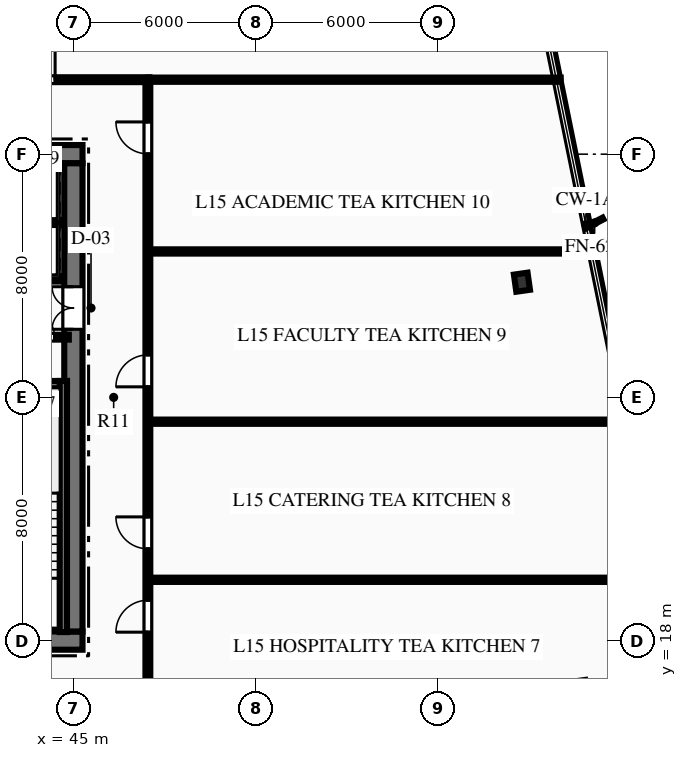
"""IFC4 building model, lengths in metres.
Left out: names, types, materials, properties, quantities, classifications, styles, units other than length and angle.
Written with IfcOpenShell. Run it as: python <this file> out.ifc"""

import sys

from ifc_helpers import new_model, si_unit, direction, frame, frame_2d, origin, origin_2d, place, context, subcontext, project, spatial, rectangle, i_section, extrude, element, fill, save


model = new_model("IFC4")
c1 = context("Model", 3, precision=1e-05, world=origin(), true_north=direction((0.0, 1.0)))
c2 = subcontext(c1, "Body", "Model", "MODEL_VIEW")
j1 = project(units=[si_unit("LENGTHUNIT", "METRE"), si_unit("PLANEANGLEUNIT", "RADIAN")], contexts=[c1])
p1 = place(None, origin())
s1 = spatial("IfcSite", under=j1, at=p1, CompositionType="ELEMENT")
p2 = place(p1, origin())
s2 = spatial("IfcBuilding", under=s1, at=p2, CompositionType="ELEMENT")
p3 = place(p2, frame((0.0, 0.0, 66.45)))
s3 = spatial("IfcBuildingStorey", under=s2, at=p3, CompositionType="ELEMENT", Elevation=66.45)
p4 = place(p3, frame((26.7, 18.0, 0.0), z_axis=(0.0, 0.0, 1.0), x_axis=(1.0, 0.0, 0.0)))
e1 = element("IfcWall", 1, at=p4, inside=s3, PredefinedType="SHEAR", context=c2, shape_type="SweptSolid", body=[
    extrude(rectangle(XDim=18.6, YDim=0.6, at=frame_2d((9.3, 0.0))), origin(), (0.0, 0.0, 1.0), 3.75),
])
p5 = place(p4, frame((7.4, 0.0, 0.0)))
e2 = element("IfcOpeningElement", 2, at=p5, cuts=e1, PredefinedType="OPENING", context=c2, shape_type="SweptSolid", body=[
    extrude(rectangle(XDim=1.1, YDim=2.15, at=frame_2d((0.55, 1.075))), frame((0.0, 0.31, 0.0), z_axis=(0.0, -1.0, 0.0), x_axis=(1.0, 0.0, 0.0)), (0.0, 0.0, 1.0), 0.62),
])
p6 = place(p4, frame((10.1, 0.0, 0.0)))
e3 = element("IfcOpeningElement", 3, at=p6, cuts=e1, PredefinedType="OPENING", context=c2, shape_type="SweptSolid", body=[
    extrude(rectangle(XDim=1.1, YDim=2.15, at=frame_2d((0.55, 1.075))), frame((0.0, 0.31, 0.0), z_axis=(0.0, -1.0, 0.0), x_axis=(1.0, 0.0, 0.0)), (0.0, 0.0, 1.0), 0.62),
])
p7 = place(p3, frame((26.7, 34.0, 0.0), z_axis=(0.0, 0.0, 1.0), x_axis=(1.0, 0.0, 0.0)))
e4 = element("IfcWall", 4, at=p7, inside=s3, PredefinedType="SHEAR", context=c2, shape_type="SweptSolid", body=[
    extrude(rectangle(XDim=18.6, YDim=0.6, at=frame_2d((9.3, 0.0))), origin(), (0.0, 0.0, 1.0), 3.75),
])
p8 = place(p7, frame((1.265, 0.0, 0.0)))
e5 = element("IfcOpeningElement", 5, at=p8, cuts=e4, PredefinedType="OPENING", context=c2, shape_type="SweptSolid", body=[
    extrude(rectangle(XDim=1.1, YDim=2.15, at=frame_2d((0.55, 1.075))), frame((0.0, 0.31, 0.0), z_axis=(0.0, -1.0, 0.0), x_axis=(1.0, 0.0, 0.0)), (0.0, 0.0, 1.0), 0.62),
])
p9 = place(p7, frame((3.515, 0.0, 0.0)))
e6 = element("IfcOpeningElement", 6, at=p9, cuts=e4, PredefinedType="OPENING", context=c2, shape_type="SweptSolid", body=[
    extrude(rectangle(XDim=1.1, YDim=2.15, at=frame_2d((0.55, 1.075))), frame((0.0, 0.31, 0.0), z_axis=(0.0, -1.0, 0.0), x_axis=(1.0, 0.0, 0.0)), (0.0, 0.0, 1.0), 0.62),
])
p10 = place(p7, frame((13.985, 0.0, 0.0)))
e7 = element("IfcOpeningElement", 7, at=p10, cuts=e4, PredefinedType="OPENING", context=c2, shape_type="SweptSolid", body=[
    extrude(rectangle(XDim=1.1, YDim=2.15, at=frame_2d((0.55, 1.075))), frame((0.0, 0.31, 0.0), z_axis=(0.0, -1.0, 0.0), x_axis=(1.0, 0.0, 0.0)), (0.0, 0.0, 1.0), 0.62),
])
p11 = place(p7, frame((16.235, 0.0, 0.0)))
e8 = element("IfcOpeningElement", 8, at=p11, cuts=e4, PredefinedType="OPENING", context=c2, shape_type="SweptSolid", body=[
    extrude(rectangle(XDim=1.1, YDim=2.15, at=frame_2d((0.55, 1.075))), frame((0.0, 0.31, 0.0), z_axis=(0.0, -1.0, 0.0), x_axis=(1.0, 0.0, 0.0)), (0.0, 0.0, 1.0), 0.62),
])
p12 = place(p3, frame((45.0, 18.3, 0.0), z_axis=(0.0, 0.0, 1.0), x_axis=(0.0, 1.0, 0.0)))
e9 = element("IfcWall", 9, at=p12, inside=s3, PredefinedType="SHEAR", context=c2, shape_type="SweptSolid", body=[
    extrude(rectangle(XDim=15.4, YDim=0.6, at=frame_2d((7.7, 0.0))), origin(), (0.0, 0.0, 1.0), 3.75),
])
p13 = place(p12, frame((9.94, 0.0, 0.0)))
e10 = element("IfcOpeningElement", 10, at=p13, cuts=e9, PredefinedType="OPENING", context=c2, shape_type="SweptSolid", body=[
    extrude(rectangle(XDim=1.4, YDim=2.2, at=frame_2d((0.7, 1.1))), frame((0.0, 0.31, 0.0), z_axis=(0.0, -1.0, 0.0), x_axis=(1.0, 0.0, 0.0)), (0.0, 0.0, 1.0), 0.62),
])
p14 = place(p3, frame((40.81, 26.42, 0.0), z_axis=(0.0, 0.0, 1.0), x_axis=(1.0, 0.0, 0.0)))
e11 = element("IfcWall", 11, at=p14, inside=s3, PredefinedType="SHEAR", context=c2, shape_type="SweptSolid", body=[
    extrude(rectangle(XDim=3.98, YDim=0.24, at=frame_2d((1.99, 0.0))), origin(), (0.0, 0.0, 1.0), 3.75),
])
p15 = place(p3, frame((44.67, 18.28, 0.0), z_axis=(0.0, 0.0, 1.0), x_axis=(0.0, 1.0, 0.0)))
e12 = element("IfcWall", 12, at=p15, inside=s3, PredefinedType="SHEAR", context=c2, shape_type="SweptSolid", body=[
    extrude(rectangle(XDim=8.26, YDim=0.24, at=frame_2d((4.13, 0.0))), origin(), (0.0, 0.0, 1.0), 3.75),
])
p16 = place(p3, frame((59.753, 29.789, 0.0), z_axis=(0.0, 0.0, 1.0), x_axis=(0.990146240249, 0.140037219771, 0.0)))
e13 = element("IfcColumn", 13, at=p16, inside=s3, PredefinedType="COLUMN", context=c2, shape_type="SweptSolid", body=[
    extrude(i_section(OverallWidth=0.454, OverallDepth=0.569, WebThickness=0.078, FlangeThickness=0.125, at=origin_2d()), origin(), (0.0, 0.0, 1.0), 3.75),
])
p17 = place(p3, frame((40.8, 27.98, 0.0), z_axis=(0.0, 0.0, 1.0), x_axis=(1.0, 0.0, 0.0)))
e14 = element("IfcWall", 14, at=p17, inside=s3, PredefinedType="PARTITIONING", context=c2, shape_type="SweptSolid", body=[
    extrude(rectangle(XDim=4.05, YDim=0.16, at=frame_2d((2.025, 0.0))), origin(), (0.0, 0.0, 1.0), 3.44),
])
p18 = place(p17, frame((0.77, 0.0, 0.0)))
e15 = element("IfcOpeningElement", 15, at=p18, cuts=e14, PredefinedType="OPENING", context=c2, shape_type="SweptSolid", body=[
    extrude(rectangle(XDim=0.9, YDim=2.15, at=frame_2d((0.45, 1.075))), frame((0.0, 0.09, 0.0), z_axis=(0.0, -1.0, 0.0), x_axis=(1.0, 0.0, 0.0)), (0.0, 0.0, 1.0), 0.18),
])
p19 = place(p17, frame((2.68, 0.0, 0.0)))
e16 = element("IfcOpeningElement", 16, at=p19, cuts=e14, PredefinedType="OPENING", context=c2, shape_type="SweptSolid", body=[
    extrude(rectangle(XDim=0.9, YDim=2.15, at=frame_2d((0.45, 1.075))), frame((0.0, 0.09, 0.0), z_axis=(0.0, -1.0, 0.0), x_axis=(1.0, 0.0, 0.0)), (0.0, 0.0, 1.0), 0.18),
])
p20 = place(p3, frame((40.12, 29.9, 0.0), z_axis=(0.0, 0.0, 1.0), x_axis=(1.0, 0.0, 0.0)))
e17 = element("IfcWall", 17, at=p20, inside=s3, PredefinedType="PARTITIONING", context=c2, shape_type="SweptSolid", body=[
    extrude(rectangle(XDim=4.43, YDim=0.18, at=frame_2d((2.215, 0.0))), origin(), (0.0, 0.0, 1.0), 3.44),
])
p21 = place(p20, frame((0.565, 0.0, 0.0)))
e18 = element("IfcOpeningElement", 18, at=p21, cuts=e17, PredefinedType="OPENING", context=c2, shape_type="SweptSolid", body=[
    extrude(rectangle(XDim=1.1, YDim=2.15, at=frame_2d((0.55, 1.075))), frame((0.0, 0.1, 0.0), z_axis=(0.0, -1.0, 0.0), x_axis=(1.0, 0.0, 0.0)), (0.0, 0.0, 1.0), 0.2),
])
p22 = place(p20, frame((2.815, 0.0, 0.0)))
e19 = element("IfcOpeningElement", 19, at=p22, cuts=e17, PredefinedType="OPENING", context=c2, shape_type="SweptSolid", body=[
    extrude(rectangle(XDim=1.1, YDim=2.15, at=frame_2d((0.55, 1.075))), frame((0.0, 0.1, 0.0), z_axis=(0.0, -1.0, 0.0), x_axis=(1.0, 0.0, 0.0)), (0.0, 0.0, 1.0), 0.2),
])
p23 = place(p3, frame((40.12, 31.75, 0.0), z_axis=(0.0, 0.0, 1.0), x_axis=(1.0, 0.0, 0.0)))
e20 = element("IfcWall", 20, at=p23, inside=s3, PredefinedType="PARTITIONING", context=c2, shape_type="SweptSolid", body=[
    extrude(rectangle(XDim=4.43, YDim=0.18, at=frame_2d((2.215, 0.0))), origin(), (0.0, 0.0, 1.0), 3.44),
])
p24 = place(p3, frame((24.5, 36.45, 0.0), z_axis=(0.0, 0.0, 1.0), x_axis=(1.0, 0.0, 0.0)))
e21 = element("IfcWall", 21, at=p24, inside=s3, PredefinedType="PARTITIONING", context=c2, shape_type="SweptSolid", body=[
    extrude(rectangle(XDim=23.0, YDim=0.16, at=frame_2d((11.5, 0.0))), origin(), (0.0, 0.0, 1.0), 3.44),
])
p25 = place(p24, frame((2.081, 0.0, 0.0)))
e22 = element("IfcOpeningElement", 22, at=p25, cuts=e21, PredefinedType="OPENING", context=c2, shape_type="SweptSolid", body=[
    extrude(rectangle(XDim=1.05, YDim=2.15, at=frame_2d((0.525, 1.075))), frame((0.0, 0.09, 0.0), z_axis=(0.0, -1.0, 0.0), x_axis=(1.0, 0.0, 0.0)), (0.0, 0.0, 1.0), 0.18),
])
p26 = place(p24, frame((12.955, 0.0, 0.0)))
e23 = element("IfcOpeningElement", 23, at=p26, cuts=e21, PredefinedType="OPENING", context=c2, shape_type="SweptSolid", body=[
    extrude(rectangle(XDim=1.05, YDim=2.15, at=frame_2d((0.525, 1.075))), frame((0.0, 0.09, 0.0), z_axis=(0.0, -1.0, 0.0), x_axis=(1.0, 0.0, 0.0)), (0.0, 0.0, 1.0), 0.18),
])
p27 = place(p24, frame((18.849, 0.0, 0.0)))
e24 = element("IfcOpeningElement", 24, at=p27, cuts=e21, PredefinedType="OPENING", context=c2, shape_type="SweptSolid", body=[
    extrude(rectangle(XDim=1.05, YDim=2.15, at=frame_2d((0.525, 1.075))), frame((0.0, 0.09, 0.0), z_axis=(0.0, -1.0, 0.0), x_axis=(1.0, 0.0, 0.0)), (0.0, 0.0, 1.0), 0.18),
])
p28 = place(p3, frame((47.45, 15.55, 0.0), z_axis=(0.0, 0.0, 1.0), x_axis=(0.0, 1.0, 0.0)))
e25 = element("IfcWall", 25, at=p28, inside=s3, PredefinedType="PARTITIONING", context=c2, shape_type="SweptSolid", body=[
    extrude(rectangle(XDim=20.9, YDim=0.16, at=frame_2d((10.45, 0.0))), origin(), (0.0, 0.0, 1.0), 3.44),
])
p29 = place(p28, frame((2.727, 0.0, 0.0)))
e26 = element("IfcOpeningElement", 26, at=p29, cuts=e25, PredefinedType="OPENING", context=c2, shape_type="SweptSolid", body=[
    extrude(rectangle(XDim=1.05, YDim=2.15, at=frame_2d((0.525, 1.075))), frame((0.0, 0.09, 0.0), z_axis=(0.0, -1.0, 0.0), x_axis=(1.0, 0.0, 0.0)), (0.0, 0.0, 1.0), 0.18),
])
p30 = place(p28, frame((5.469, 0.0, 0.0)))
e27 = element("IfcOpeningElement", 27, at=p30, cuts=e25, PredefinedType="OPENING", context=c2, shape_type="SweptSolid", body=[
    extrude(rectangle(XDim=1.05, YDim=2.15, at=frame_2d((0.525, 1.075))), frame((0.0, 0.09, 0.0), z_axis=(0.0, -1.0, 0.0), x_axis=(1.0, 0.0, 0.0)), (0.0, 0.0, 1.0), 0.18),
])
p31 = place(p28, frame((10.797, 0.0, 0.0)))
e28 = element("IfcOpeningElement", 28, at=p31, cuts=e25, PredefinedType="OPENING", context=c2, shape_type="SweptSolid", body=[
    extrude(rectangle(XDim=1.05, YDim=2.15, at=frame_2d((0.525, 1.075))), frame((0.0, 0.09, 0.0), z_axis=(0.0, -1.0, 0.0), x_axis=(1.0, 0.0, 0.0)), (0.0, 0.0, 1.0), 0.18),
])
p32 = place(p28, frame((18.461, 0.0, 0.0)))
e29 = element("IfcOpeningElement", 29, at=p32, cuts=e25, PredefinedType="OPENING", context=c2, shape_type="SweptSolid", body=[
    extrude(rectangle(XDim=1.05, YDim=2.15, at=frame_2d((0.525, 1.075))), frame((0.0, 0.09, 0.0), z_axis=(0.0, -1.0, 0.0), x_axis=(1.0, 0.0, 0.0)), (0.0, 0.0, 1.0), 0.18),
])
p33 = place(p3, frame((47.45, 36.45, 0.0), z_axis=(0.0, 0.0, 1.0), x_axis=(1.0, 0.0, 0.0)))
e30 = element("IfcWall", 30, at=p33, inside=s3, PredefinedType="PARTITIONING", context=c2, shape_type="SweptSolid", body=[
    extrude(rectangle(XDim=13.579, YDim=0.14, at=frame_2d((6.79, 0.0))), origin(), (0.0, 0.0, 1.0), 3.44),
])
p34 = place(p3, frame((47.45, 20.0, 0.0), z_axis=(0.0, 0.0, 1.0), x_axis=(1.0, 0.0, 0.0)))
e31 = element("IfcWall", 31, at=p34, inside=s3, PredefinedType="PARTITIONING", context=c2, shape_type="SweptSolid", body=[
    extrude(rectangle(XDim=16.926, YDim=0.14, at=frame_2d((8.463, 0.0))), origin(), (0.0, 0.0, 1.0), 3.44),
])
p35 = place(p3, frame((47.45, 25.2, 0.0), z_axis=(0.0, 0.0, 1.0), x_axis=(1.0, 0.0, 0.0)))
e32 = element("IfcWall", 32, at=p35, inside=s3, PredefinedType="PARTITIONING", context=c2, shape_type="SweptSolid", body=[
    extrude(rectangle(XDim=15.868, YDim=0.14, at=frame_2d((7.934, 0.0))), origin(), (0.0, 0.0, 1.0), 3.44),
])
p36 = place(p3, frame((47.45, 30.8, 0.0), z_axis=(0.0, 0.0, 1.0), x_axis=(1.0, 0.0, 0.0)))
e33 = element("IfcWall", 33, at=p36, inside=s3, PredefinedType="PARTITIONING", context=c2, shape_type="SweptSolid", body=[
    extrude(rectangle(XDim=14.729, YDim=0.14, at=frame_2d((7.364, 0.0))), origin(), (0.0, 0.0, 1.0), 3.44),
])
p37 = place(p19, origin())
e34 = element("IfcDoor", 34, at=p37, inside=s3, OperationType="SINGLE_SWING_LEFT", PredefinedType="DOOR", context=c2, shape_type="SweptSolid", body=[
    extrude(rectangle(XDim=0.9, YDim=2.15, at=frame_2d((0.45, 1.075))), frame((0.0, 0.025, 0.0), z_axis=(0.0, -1.0, 0.0), x_axis=(1.0, 0.0, 0.0)), (0.0, 0.0, 1.0), 0.05),
])
fill(e16, e34)
p38 = place(p13, origin())
e35 = element("IfcDoor", 35, at=p38, inside=s3, OperationType="DOUBLE_DOOR_SINGLE_SWING", PredefinedType="DOOR", context=c2, shape_type="SweptSolid", body=[
    extrude(rectangle(XDim=1.4, YDim=2.2, at=frame_2d((0.7, 1.1))), frame((0.0, 0.025, 0.0), z_axis=(0.0, -1.0, 0.0), x_axis=(1.0, 0.0, 0.0)), (0.0, 0.0, 1.0), 0.05),
])
fill(e10, e35)
p39 = place(p27, origin())
e36 = element("IfcDoor", 36, at=p39, inside=s3, OperationType="SINGLE_SWING_RIGHT", PredefinedType="DOOR", context=c2, shape_type="SweptSolid", body=[
    extrude(rectangle(XDim=1.05, YDim=2.15, at=frame_2d((0.525, 1.075))), frame((0.0, 0.025, 0.0), z_axis=(0.0, -1.0, 0.0), x_axis=(1.0, 0.0, 0.0)), (0.0, 0.0, 1.0), 0.05),
])
fill(e24, e36)
p40 = place(p29, origin())
e37 = element("IfcDoor", 37, at=p40, inside=s3, OperationType="SINGLE_SWING_LEFT", PredefinedType="DOOR", context=c2, shape_type="SweptSolid", body=[
    extrude(rectangle(XDim=1.05, YDim=2.15, at=frame_2d((0.525, 1.075))), frame((0.0, 0.025, 0.0), z_axis=(0.0, -1.0, 0.0), x_axis=(1.0, 0.0, 0.0)), (0.0, 0.0, 1.0), 0.05),
])
fill(e26, e37)
p41 = place(p30, origin())
e38 = element("IfcDoor", 38, at=p41, inside=s3, OperationType="SINGLE_SWING_RIGHT", PredefinedType="DOOR", context=c2, shape_type="SweptSolid", body=[
    extrude(rectangle(XDim=1.05, YDim=2.15, at=frame_2d((0.525, 1.075))), frame((0.0, 0.025, 0.0), z_axis=(0.0, -1.0, 0.0), x_axis=(1.0, 0.0, 0.0)), (0.0, 0.0, 1.0), 0.05),
])
fill(e27, e38)
p42 = place(p31, origin())
e39 = element("IfcDoor", 39, at=p42, inside=s3, OperationType="SINGLE_SWING_LEFT", PredefinedType="DOOR", context=c2, shape_type="SweptSolid", body=[
    extrude(rectangle(XDim=1.05, YDim=2.15, at=frame_2d((0.525, 1.075))), frame((0.0, 0.025, 0.0), z_axis=(0.0, -1.0, 0.0), x_axis=(1.0, 0.0, 0.0)), (0.0, 0.0, 1.0), 0.05),
])
fill(e28, e39)
p43 = place(p32, origin())
e40 = element("IfcDoor", 40, at=p43, inside=s3, OperationType="SINGLE_SWING_RIGHT", PredefinedType="DOOR", context=c2, shape_type="SweptSolid", body=[
    extrude(rectangle(XDim=1.05, YDim=2.15, at=frame_2d((0.525, 1.075))), frame((0.0, 0.025, 0.0), z_axis=(0.0, -1.0, 0.0), x_axis=(1.0, 0.0, 0.0)), (0.0, 0.0, 1.0), 0.05),
])
fill(e29, e40)
save(model, sys.argv[1])
